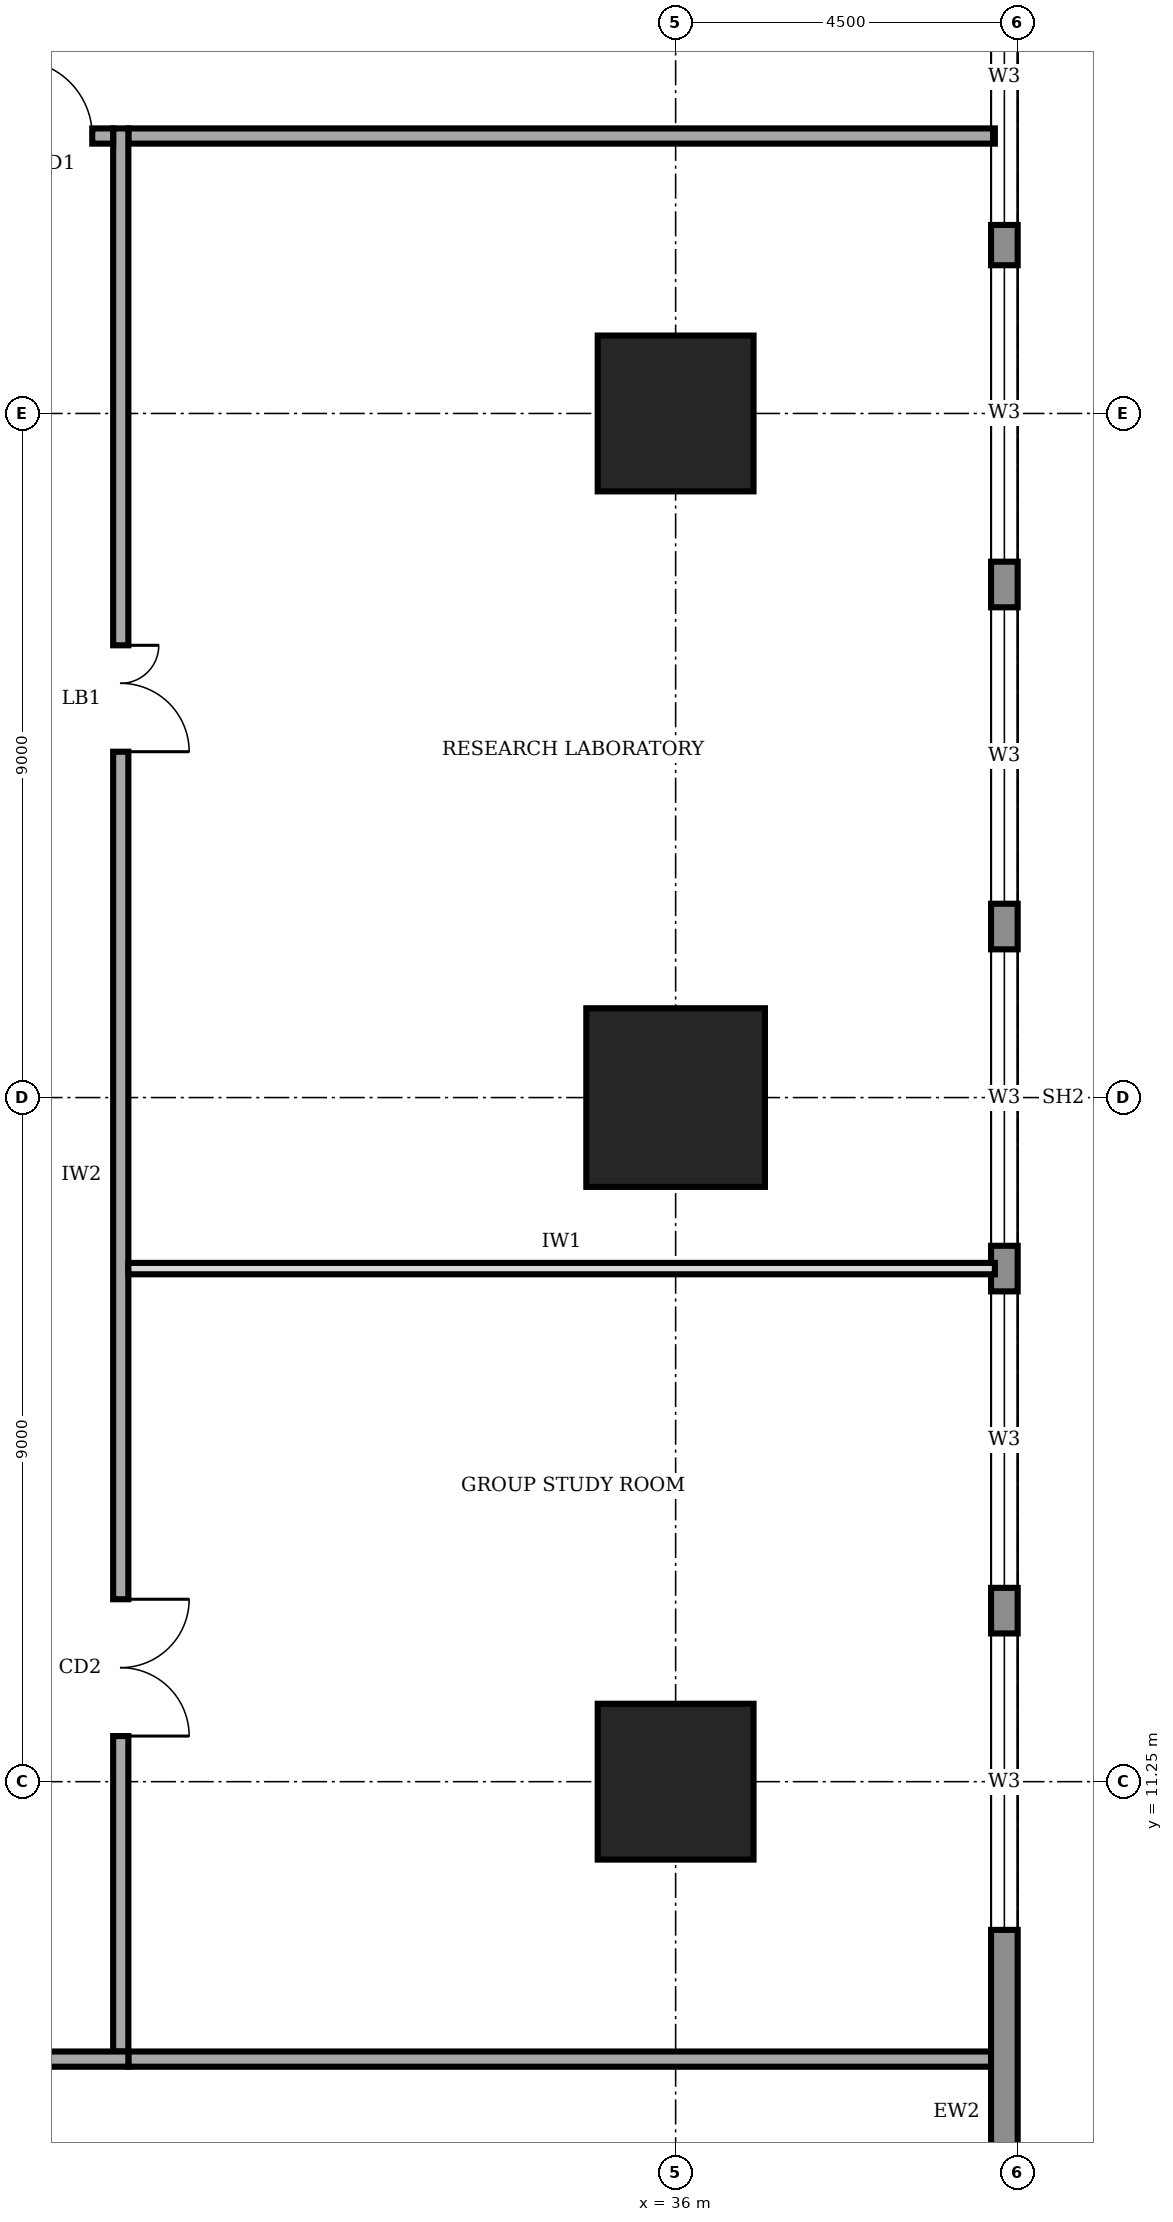
"""IFC4 building model, lengths in metres.
Left out: names, types, materials, properties, quantities, classifications, styles, units other than length and angle.
Written with IfcOpenShell. Run it as: python <this file> out.ifc"""

import sys

from ifc_helpers import new_model, si_unit, direction, frame, frame_2d, origin, origin_2d, place, context, subcontext, project, spatial, rectangle, extrude, element, fill, save


model = new_model("IFC4")
c1 = context("Model", 3, precision=1e-05, world=origin(), true_north=direction((0.0, 1.0)))
c2 = subcontext(c1, "Body", "Model", "MODEL_VIEW")
j1 = project(units=[si_unit("LENGTHUNIT", "METRE"), si_unit("PLANEANGLEUNIT", "RADIAN")], contexts=[c1])
p1 = place(None, origin())
s1 = spatial("IfcSite", under=j1, at=p1, CompositionType="ELEMENT")
p2 = place(p1, origin())
s2 = spatial("IfcBuilding", under=s1, at=p2, CompositionType="ELEMENT")
p3 = place(p2, frame((0.0, 0.0, 193.0)))
s3 = spatial("IfcBuildingStorey", under=s2, at=p3, CompositionType="ELEMENT", Elevation=193.0)
p4 = place(p3, frame((36.0, 11.25, 0.0), z_axis=(0.0, 0.0, 1.0), x_axis=(1.0, 0.0, 0.0)))
e1 = element("IfcColumn", 1, at=p4, inside=s3, PredefinedType="COLUMN", context=c2, shape_type="SweptSolid", body=[
    extrude(rectangle(XDim=2.05, YDim=2.05, at=origin_2d()), origin(), (0.0, 0.0, 1.0), 4.0),
])
p5 = place(p3, frame((36.0, 20.25, 0.0), z_axis=(0.0, 0.0, 1.0), x_axis=(1.0, 0.0, 0.0)))
e2 = element("IfcColumn", 2, at=p5, inside=s3, PredefinedType="COLUMN", context=c2, shape_type="SweptSolid", body=[
    extrude(rectangle(XDim=2.35, YDim=2.35, at=origin_2d()), origin(), (0.0, 0.0, 1.0), 4.0),
])
p6 = place(p3, frame((36.0, 29.25, 0.0), z_axis=(0.0, 0.0, 1.0), x_axis=(1.0, 0.0, 0.0)))
e3 = element("IfcColumn", 3, at=p6, inside=s3, PredefinedType="COLUMN", context=c2, shape_type="SweptSolid", body=[
    extrude(rectangle(XDim=2.05, YDim=2.05, at=origin_2d()), origin(), (0.0, 0.0, 1.0), 4.0),
])
p7 = place(p3, frame((40.325, 4.52, 0.0), z_axis=(0.0, 0.0, 1.0), x_axis=(0.0, 1.0, 0.0)))
e4 = element("IfcWall", 4, at=p7, inside=s3, PredefinedType="STANDARD", context=c2, shape_type="SweptSolid", body=[
    extrude(rectangle(XDim=31.46, YDim=0.35, at=frame_2d((15.73, 0.0))), origin(), (0.0, 0.0, 1.0), 3.75),
])
p8 = place(p7, frame((4.78, 0.0, 0.95)))
e5 = element("IfcOpeningElement", 5, at=p8, cuts=e4, PredefinedType="OPENING", context=c2, shape_type="SweptSolid", body=[
    extrude(rectangle(XDim=3.9, YDim=1.8, at=frame_2d((1.95, 0.9))), frame((0.0, 0.185, 0.0), z_axis=(0.0, -1.0, 0.0), x_axis=(1.0, 0.0, 0.0)), (0.0, 0.0, 1.0), 0.37),
])
p9 = place(p7, frame((9.28, 0.0, 0.95)))
e6 = element("IfcOpeningElement", 6, at=p9, cuts=e4, PredefinedType="OPENING", context=c2, shape_type="SweptSolid", body=[
    extrude(rectangle(XDim=3.9, YDim=1.8, at=frame_2d((1.95, 0.9))), frame((0.0, 0.185, 0.0), z_axis=(0.0, -1.0, 0.0), x_axis=(1.0, 0.0, 0.0)), (0.0, 0.0, 1.0), 0.37),
])
p10 = place(p7, frame((13.78, 0.0, 0.95)))
e7 = element("IfcOpeningElement", 7, at=p10, cuts=e4, PredefinedType="OPENING", context=c2, shape_type="SweptSolid", body=[
    extrude(rectangle(XDim=3.9, YDim=1.8, at=frame_2d((1.95, 0.9))), frame((0.0, 0.185, 0.0), z_axis=(0.0, -1.0, 0.0), x_axis=(1.0, 0.0, 0.0)), (0.0, 0.0, 1.0), 0.37),
])
p11 = place(p7, frame((18.28, 0.0, 0.95)))
e8 = element("IfcOpeningElement", 8, at=p11, cuts=e4, PredefinedType="OPENING", context=c2, shape_type="SweptSolid", body=[
    extrude(rectangle(XDim=3.9, YDim=1.8, at=frame_2d((1.95, 0.9))), frame((0.0, 0.185, 0.0), z_axis=(0.0, -1.0, 0.0), x_axis=(1.0, 0.0, 0.0)), (0.0, 0.0, 1.0), 0.37),
])
p12 = place(p7, frame((22.78, 0.0, 0.95)))
e9 = element("IfcOpeningElement", 9, at=p12, cuts=e4, PredefinedType="OPENING", context=c2, shape_type="SweptSolid", body=[
    extrude(rectangle(XDim=3.9, YDim=1.8, at=frame_2d((1.95, 0.9))), frame((0.0, 0.185, 0.0), z_axis=(0.0, -1.0, 0.0), x_axis=(1.0, 0.0, 0.0)), (0.0, 0.0, 1.0), 0.37),
])
p13 = place(p7, frame((27.21, 0.0, 0.95)))
e10 = element("IfcOpeningElement", 10, at=p13, cuts=e4, PredefinedType="OPENING", context=c2, shape_type="SweptSolid", body=[
    extrude(rectangle(XDim=3.9, YDim=1.8, at=frame_2d((1.95, 0.9))), frame((0.0, 0.185, 0.0), z_axis=(0.0, -1.0, 0.0), x_axis=(1.0, 0.0, 0.0)), (0.0, 0.0, 1.0), 0.37),
])
p14 = place(p3, frame((11.9, 7.6, 0.0), z_axis=(0.0, 0.0, 1.0), x_axis=(1.0, 0.0, 0.0)))
e11 = element("IfcWall", 11, at=p14, inside=s3, PredefinedType="SOLIDWALL", context=c2, shape_type="SweptSolid", body=[
    extrude(rectangle(XDim=16.9, YDim=0.2, at=frame_2d((8.45, 0.0))), origin(), (0.0, 0.0, 1.0), 3.75),
])
p15 = place(p14, frame((2.05, 0.0, 0.0)))
e12 = element("IfcOpeningElement", 12, at=p15, cuts=e11, PredefinedType="OPENING", context=c2, shape_type="SweptSolid", body=[
    extrude(rectangle(XDim=1.8, YDim=2.1, at=frame_2d((0.9, 1.05))), frame((0.0, 0.11, 0.0), z_axis=(0.0, -1.0, 0.0), x_axis=(1.0, 0.0, 0.0)), (0.0, 0.0, 1.0), 0.22),
])
p16 = place(p14, frame((7.85, 0.0, 0.0)))
e13 = element("IfcOpeningElement", 13, at=p16, cuts=e11, PredefinedType="OPENING", context=c2, shape_type="SweptSolid", body=[
    extrude(rectangle(XDim=1.0, YDim=2.1, at=frame_2d((0.5, 1.05))), frame((0.0, 0.11, 0.0), z_axis=(0.0, -1.0, 0.0), x_axis=(1.0, 0.0, 0.0)), (0.0, 0.0, 1.0), 0.22),
])
p17 = place(p14, frame((12.85, 0.0, 0.0)))
e14 = element("IfcOpeningElement", 14, at=p17, cuts=e11, PredefinedType="OPENING", context=c2, shape_type="SweptSolid", body=[
    extrude(rectangle(XDim=1.8, YDim=2.1, at=frame_2d((0.9, 1.05))), frame((0.0, 0.11, 0.0), z_axis=(0.0, -1.0, 0.0), x_axis=(1.0, 0.0, 0.0)), (0.0, 0.0, 1.0), 0.22),
])
p18 = place(p3, frame((28.7, 7.7, 0.0), z_axis=(0.0, 0.0, 1.0), x_axis=(0.0, 1.0, 0.0)))
e15 = element("IfcWall", 15, at=p18, inside=s3, PredefinedType="SOLIDWALL", context=c2, shape_type="SweptSolid", body=[
    extrude(rectangle(XDim=25.3, YDim=0.2, at=frame_2d((12.65, 0.0))), origin(), (0.0, 0.0, 1.0), 3.75),
])
p19 = place(p18, frame((4.15, 0.0, 0.0)))
e16 = element("IfcOpeningElement", 16, at=p19, cuts=e15, PredefinedType="OPENING", context=c2, shape_type="SweptSolid", body=[
    extrude(rectangle(XDim=1.8, YDim=2.1, at=frame_2d((0.9, 1.05))), frame((0.0, 0.11, 0.0), z_axis=(0.0, -1.0, 0.0), x_axis=(1.0, 0.0, 0.0)), (0.0, 0.0, 1.0), 0.22),
])
p20 = place(p18, frame((17.1, 0.0, 0.0)))
e17 = element("IfcOpeningElement", 17, at=p20, cuts=e15, PredefinedType="OPENING", context=c2, shape_type="SweptSolid", body=[
    extrude(rectangle(XDim=1.4, YDim=2.1, at=frame_2d((0.7, 1.05))), frame((0.0, 0.11, 0.0), z_axis=(0.0, -1.0, 0.0), x_axis=(1.0, 0.0, 0.0)), (0.0, 0.0, 1.0), 0.22),
])
p21 = place(p3, frame((28.6, 32.9, 0.0), z_axis=(0.0, 0.0, 1.0), x_axis=(-1.0, 0.0, 0.0)))
e18 = element("IfcWall", 18, at=p21, inside=s3, PredefinedType="SOLIDWALL", context=c2, shape_type="SweptSolid", body=[
    extrude(rectangle(XDim=16.9, YDim=0.2, at=frame_2d((8.45, 0.0))), origin(), (0.0, 0.0, 1.0), 3.75),
])
p22 = place(p21, frame((15.425, 0.0, 0.0)))
e19 = element("IfcOpeningElement", 19, at=p22, cuts=e18, PredefinedType="OPENING", context=c2, shape_type="SweptSolid", body=[
    extrude(rectangle(XDim=1.0, YDim=2.1, at=frame_2d((0.5, 1.05))), frame((0.0, 0.11, 0.0), z_axis=(0.0, -1.0, 0.0), x_axis=(1.0, 0.0, 0.0)), (0.0, 0.0, 1.0), 0.22),
])
p23 = place(p21, frame((12.35, 0.0, 0.0)))
e20 = element("IfcOpeningElement", 20, at=p23, cuts=e18, PredefinedType="OPENING", context=c2, shape_type="SweptSolid", body=[
    extrude(rectangle(XDim=1.0, YDim=2.1, at=frame_2d((0.5, 1.05))), frame((0.0, 0.11, 0.0), z_axis=(0.0, -1.0, 0.0), x_axis=(1.0, 0.0, 0.0)), (0.0, 0.0, 1.0), 0.22),
])
p24 = place(p21, frame((5.6, 0.0, 0.0)))
e21 = element("IfcOpeningElement", 21, at=p24, cuts=e18, PredefinedType="OPENING", context=c2, shape_type="SweptSolid", body=[
    extrude(rectangle(XDim=1.0, YDim=2.1, at=frame_2d((0.5, 1.05))), frame((0.0, 0.11, 0.0), z_axis=(0.0, -1.0, 0.0), x_axis=(1.0, 0.0, 0.0)), (0.0, 0.0, 1.0), 0.22),
])
p25 = place(p21, frame((0.275, 0.0, 0.0)))
e22 = element("IfcOpeningElement", 22, at=p25, cuts=e18, PredefinedType="OPENING", context=c2, shape_type="SweptSolid", body=[
    extrude(rectangle(XDim=1.0, YDim=2.1, at=frame_2d((0.5, 1.05))), frame((0.0, 0.11, 0.0), z_axis=(0.0, -1.0, 0.0), x_axis=(1.0, 0.0, 0.0)), (0.0, 0.0, 1.0), 0.22),
])
for number, where, z_axis, x_axis in (
    (23, (28.8, 7.6, 0.0), (0.0, 0.0, 1.0), (1.0, 0.0, 0.0)),
    (24, (28.8, 32.9, 0.0), (0.0, 0.0, 1.0), (1.0, 0.0, 0.0)),
):
    element("IfcWall", number, at=place(p3, frame(where, z_axis=z_axis, x_axis=x_axis)), inside=s3, PredefinedType="SOLIDWALL", context=c2, shape_type="SweptSolid", body=[
        extrude(rectangle(XDim=11.4, YDim=0.2, at=frame_2d((5.7, 0.0))), origin(), (0.0, 0.0, 1.0), 3.75),
    ])
p26 = place(p3, frame((28.8, 18.0, 0.0), z_axis=(0.0, 0.0, 1.0), x_axis=(1.0, 0.0, 0.0)))
e25 = element("IfcWall", 25, at=p26, inside=s3, PredefinedType="PARTITIONING", context=c2, shape_type="SweptSolid", body=[
    extrude(rectangle(XDim=11.4, YDim=0.15, at=frame_2d((5.7, 0.0))), origin(), (0.0, 0.0, 1.0), 3.75),
])
p27 = place(p8, origin())
e26 = element("IfcWindow", 26, at=p27, inside=s3, PartitioningType="SINGLE_PANEL", PredefinedType="WINDOW", context=c2, shape_type="SweptSolid", body=[
    extrude(rectangle(XDim=3.9, YDim=1.8, at=frame_2d((1.95, 0.9))), frame((0.0, 0.03, 0.0), z_axis=(0.0, -1.0, 0.0), x_axis=(1.0, 0.0, 0.0)), (0.0, 0.0, 1.0), 0.06),
])
fill(e5, e26)
p28 = place(p9, origin())
e27 = element("IfcWindow", 27, at=p28, inside=s3, PartitioningType="SINGLE_PANEL", PredefinedType="WINDOW", context=c2, shape_type="SweptSolid", body=[
    extrude(rectangle(XDim=3.9, YDim=1.8, at=frame_2d((1.95, 0.9))), frame((0.0, 0.03, 0.0), z_axis=(0.0, -1.0, 0.0), x_axis=(1.0, 0.0, 0.0)), (0.0, 0.0, 1.0), 0.06),
])
fill(e6, e27)
p29 = place(p10, origin())
e28 = element("IfcWindow", 28, at=p29, inside=s3, PartitioningType="SINGLE_PANEL", PredefinedType="WINDOW", context=c2, shape_type="SweptSolid", body=[
    extrude(rectangle(XDim=3.9, YDim=1.8, at=frame_2d((1.95, 0.9))), frame((0.0, 0.03, 0.0), z_axis=(0.0, -1.0, 0.0), x_axis=(1.0, 0.0, 0.0)), (0.0, 0.0, 1.0), 0.06),
])
fill(e7, e28)
p30 = place(p11, origin())
e29 = element("IfcWindow", 29, at=p30, inside=s3, PartitioningType="SINGLE_PANEL", PredefinedType="WINDOW", context=c2, shape_type="SweptSolid", body=[
    extrude(rectangle(XDim=3.9, YDim=1.8, at=frame_2d((1.95, 0.9))), frame((0.0, 0.03, 0.0), z_axis=(0.0, -1.0, 0.0), x_axis=(1.0, 0.0, 0.0)), (0.0, 0.0, 1.0), 0.06),
])
fill(e8, e29)
p31 = place(p12, origin())
e30 = element("IfcWindow", 30, at=p31, inside=s3, PartitioningType="SINGLE_PANEL", PredefinedType="WINDOW", context=c2, shape_type="SweptSolid", body=[
    extrude(rectangle(XDim=3.9, YDim=1.8, at=frame_2d((1.95, 0.9))), frame((0.0, 0.03, 0.0), z_axis=(0.0, -1.0, 0.0), x_axis=(1.0, 0.0, 0.0)), (0.0, 0.0, 1.0), 0.06),
])
fill(e9, e30)
p32 = place(p13, origin())
e31 = element("IfcWindow", 31, at=p32, inside=s3, PartitioningType="SINGLE_PANEL", PredefinedType="WINDOW", context=c2, shape_type="SweptSolid", body=[
    extrude(rectangle(XDim=3.9, YDim=1.8, at=frame_2d((1.95, 0.9))), frame((0.0, 0.03, 0.0), z_axis=(0.0, -1.0, 0.0), x_axis=(1.0, 0.0, 0.0)), (0.0, 0.0, 1.0), 0.06),
])
fill(e10, e31)
p33 = place(p19, frame((1.8, 0.0, 0.0), z_axis=(0.0, 0.0, 1.0), x_axis=(-1.0, 0.0, 0.0)))
e32 = element("IfcDoor", 32, at=p33, inside=s3, OperationType="DOUBLE_DOOR_SINGLE_SWING", PredefinedType="DOOR", context=c2, shape_type="SweptSolid", body=[
    extrude(rectangle(XDim=1.8, YDim=2.1, at=frame_2d((0.9, 1.05))), frame((0.0, 0.025, 0.0), z_axis=(0.0, -1.0, 0.0), x_axis=(1.0, 0.0, 0.0)), (0.0, 0.0, 1.0), 0.05),
])
fill(e16, e32)
p34 = place(p20, frame((1.4, 0.0, 0.0), z_axis=(0.0, 0.0, 1.0), x_axis=(-1.0, 0.0, 0.0)))
e33 = element("IfcDoor", 33, at=p34, inside=s3, OperationType="DOUBLE_DOOR_SINGLE_SWING", PredefinedType="DOOR", context=c2, shape_type="SweptSolid", body=[
    extrude(rectangle(XDim=1.4, YDim=2.1, at=frame_2d((0.7, 1.05))), frame((0.0, 0.025, 0.0), z_axis=(0.0, -1.0, 0.0), x_axis=(1.0, 0.0, 0.0)), (0.0, 0.0, 1.0), 0.05),
])
fill(e17, e33)
p35 = place(p25, frame((1.0, 0.0, 0.0), z_axis=(0.0, 0.0, 1.0), x_axis=(-1.0, 0.0, 0.0)))
e34 = element("IfcDoor", 34, at=p35, inside=s3, OperationType="SINGLE_SWING_LEFT", PredefinedType="DOOR", context=c2, shape_type="SweptSolid", body=[
    extrude(rectangle(XDim=1.0, YDim=2.1, at=frame_2d((0.5, 1.05))), frame((0.0, 0.025, 0.0), z_axis=(0.0, -1.0, 0.0), x_axis=(1.0, 0.0, 0.0)), (0.0, 0.0, 1.0), 0.05),
])
fill(e22, e34)
save(model, sys.argv[1])
